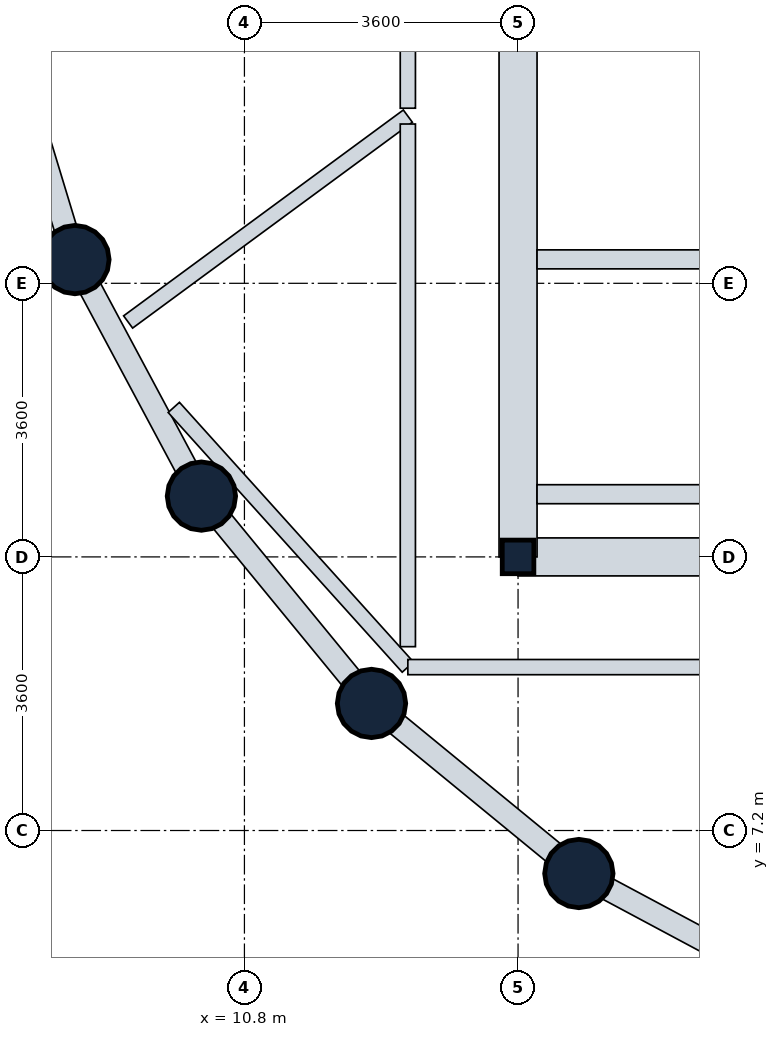
"""IFC4 building model, lengths in metres.
Left out: names, types, materials, properties, quantities, classifications, styles, units other than length and angle.
Written with IfcOpenShell. Run it as: python <this file> out.ifc"""

import sys

from ifc_helpers import new_model, si_unit, direction, frame, frame_2d, origin, origin_2d, place, context, subcontext, project, spatial, rectangle, circle, i_section, extrude, element, fill, save


model = new_model("IFC4")
c1 = context("Model", 3, precision=1e-05, world=origin(), true_north=direction((0.0, 1.0)))
c2 = subcontext(c1, "Body", "Model", "MODEL_VIEW")
j1 = project(units=[si_unit("LENGTHUNIT", "METRE"), si_unit("PLANEANGLEUNIT", "RADIAN")], contexts=[c1])
p1 = place(None, origin())
s1 = spatial("IfcSite", under=j1, at=p1, CompositionType="ELEMENT")
p2 = place(p1, origin())
s2 = spatial("IfcBuilding", under=s1, at=p2, CompositionType="ELEMENT")
p3 = place(p2, frame((0.0, 0.0, 139.0)))
s3 = spatial("IfcBuildingStorey", under=s2, at=p3, CompositionType="ELEMENT", Elevation=139.0)
for number, where, z_axis, x_axis in (
    (1, (8.57, 14.712, 0.0), (0.0, 0.0, 1.0), (1.0, 0.0, 0.0)),
    (2, (10.234, 11.6, 0.0), (0.0, 0.0, 1.0), (1.0, 0.0, 0.0)),
    (3, (12.472, 8.872, 0.0), (0.0, 0.0, 1.0), (1.0, 0.0, 0.0)),
):
    element("IfcColumn", number, at=place(p3, frame(where, z_axis=z_axis, x_axis=x_axis)), inside=s3, PredefinedType="COLUMN", context=c2, shape_type="SweptSolid", body=[
        extrude(circle(Radius=0.45, at=origin_2d()), origin(), (0.0, 0.0, 1.0), 3.8),
    ])
p4 = place(p3, frame((14.4, 10.8, 0.0), z_axis=(0.0, 0.0, 1.0), x_axis=(1.0, 0.0, 0.0)))
e4 = element("IfcColumn", 4, at=p4, inside=s3, PredefinedType="COLUMN", context=c2, shape_type="SweptSolid", body=[
    extrude(i_section(OverallWidth=0.416, OverallDepth=0.442, WebThickness=0.025, FlangeThickness=0.041, FilletRadius=0.015, at=origin_2d()), origin(), (0.0, 0.0, 1.0), 3.8),
])
p5 = place(p3, frame((15.2, 6.634, 0.0), z_axis=(0.0, 0.0, 1.0), x_axis=(1.0, 0.0, 0.0)))
e5 = element("IfcColumn", 5, at=p5, inside=s3, PredefinedType="COLUMN", context=c2, shape_type="SweptSolid", body=[
    extrude(circle(Radius=0.45, at=origin_2d()), origin(), (0.0, 0.0, 1.0), 3.8),
])
p6 = place(p3, frame((8.57, 14.712, 0.0), z_axis=(0.0, 0.0, 1.0), x_axis=(-0.290305086481, 0.956934144423, 0.0)))
e6 = element("IfcWall", 6, at=p6, inside=s3, PredefinedType="STANDARD", context=c2, shape_type="SweptSolid", body=[
    extrude(rectangle(XDim=3.528, YDim=0.3, at=frame_2d((1.764, 0.0))), origin(), (0.0, 0.0, 1.0), 2.93),
])
p7 = place(p6, frame((0.964, 0.0, 0.85)))
e7 = element("IfcOpeningElement", 7, at=p7, cuts=e6, PredefinedType="OPENING", context=c2, shape_type="SweptSolid", body=[
    extrude(rectangle(XDim=1.6, YDim=1.35, at=frame_2d((0.8, 0.675))), frame((0.0, 0.16, 0.0), z_axis=(0.0, -1.0, 0.0), x_axis=(1.0, 0.0, 0.0)), (0.0, 0.0, 1.0), 0.32),
])
p8 = place(p3, frame((10.234, 11.6, 0.0), z_axis=(0.0, 0.0, 1.0), x_axis=(-0.47151087309, 0.881860247748, 0.0)))
e8 = element("IfcWall", 8, at=p8, inside=s3, PredefinedType="STANDARD", context=c2, shape_type="SweptSolid", body=[
    extrude(rectangle(XDim=3.529, YDim=0.3, at=frame_2d((1.764, 0.0))), origin(), (0.0, 0.0, 1.0), 2.93),
])
p9 = place(p3, frame((12.472, 8.872, 0.0), z_axis=(0.0, 0.0, 1.0), x_axis=(-0.634258295121, 0.773121216285, 0.0)))
e9 = element("IfcWall", 9, at=p9, inside=s3, PredefinedType="STANDARD", context=c2, shape_type="SweptSolid", body=[
    extrude(rectangle(XDim=3.529, YDim=0.3, at=frame_2d((1.764, 0.0))), origin(), (0.0, 0.0, 1.0), 2.93),
])
p10 = place(p9, frame((0.964, 0.0, 0.85)))
e10 = element("IfcOpeningElement", 10, at=p10, cuts=e9, PredefinedType="OPENING", context=c2, shape_type="SweptSolid", body=[
    extrude(rectangle(XDim=1.6, YDim=1.35, at=frame_2d((0.8, 0.675))), frame((0.0, 0.16, 0.0), z_axis=(0.0, -1.0, 0.0), x_axis=(1.0, 0.0, 0.0)), (0.0, 0.0, 1.0), 0.32),
])
p11 = place(p3, frame((15.2, 6.634, 0.0), z_axis=(0.0, 0.0, 1.0), x_axis=(-0.773121216285, 0.634258295121, 0.0)))
e11 = element("IfcWall", 11, at=p11, inside=s3, PredefinedType="STANDARD", context=c2, shape_type="SweptSolid", body=[
    extrude(rectangle(XDim=3.529, YDim=0.3, at=frame_2d((1.764, 0.0))), origin(), (0.0, 0.0, 1.0), 2.93),
])
p12 = place(p11, frame((0.964, 0.0, 0.85)))
e12 = element("IfcOpeningElement", 12, at=p12, cuts=e11, PredefinedType="OPENING", context=c2, shape_type="SweptSolid", body=[
    extrude(rectangle(XDim=1.6, YDim=1.35, at=frame_2d((0.8, 0.675))), frame((0.0, 0.16, 0.0), z_axis=(0.0, -1.0, 0.0), x_axis=(1.0, 0.0, 0.0)), (0.0, 0.0, 1.0), 0.32),
])
p13 = place(p3, frame((18.312, 4.97, 0.0), z_axis=(0.0, 0.0, 1.0), x_axis=(-0.881846862014, 0.471535907389, 0.0)))
e13 = element("IfcWall", 13, at=p13, inside=s3, PredefinedType="STANDARD", context=c2, shape_type="SweptSolid", body=[
    extrude(rectangle(XDim=3.529, YDim=0.3, at=frame_2d((1.765, 0.0))), origin(), (0.0, 0.0, 1.0), 2.93),
])
p14 = place(p13, frame((0.964, 0.0, 0.85)))
e14 = element("IfcOpeningElement", 14, at=p14, cuts=e13, PredefinedType="OPENING", context=c2, shape_type="SweptSolid", body=[
    extrude(rectangle(XDim=1.6, YDim=1.35, at=frame_2d((0.8, 0.675))), frame((0.0, 0.16, 0.0), z_axis=(0.0, -1.0, 0.0), x_axis=(1.0, 0.0, 0.0)), (0.0, 0.0, 1.0), 0.32),
])
p15 = place(p3, frame((14.4, 10.8, 0.0), z_axis=(0.0, 0.0, 1.0), x_axis=(1.0, 0.0, 0.0)))
e15 = element("IfcWall", 15, at=p15, inside=s3, PredefinedType="SHEAR", context=c2, shape_type="SweptSolid", body=[
    extrude(rectangle(XDim=18.0, YDim=0.5, at=frame_2d((9.0, 0.0))), origin(), (0.0, 0.0, 1.0), 3.55),
])
p16 = place(p3, frame((14.4, 10.8, 0.0), z_axis=(0.0, 0.0, 1.0), x_axis=(0.0, 1.0, 0.0)))
e16 = element("IfcWall", 16, at=p16, inside=s3, PredefinedType="SHEAR", context=c2, shape_type="SweptSolid", body=[
    extrude(rectangle(XDim=14.4, YDim=0.5, at=frame_2d((7.2, 0.0))), origin(), (0.0, 0.0, 1.0), 3.55),
])
p17 = place(p16, frame((11.05, 0.0, 0.0)))
e17 = element("IfcOpeningElement", 17, at=p17, cuts=e16, PredefinedType="OPENING", context=c2, shape_type="SweptSolid", body=[
    extrude(rectangle(XDim=1.1, YDim=2.1, at=frame_2d((0.55, 1.05))), frame((0.0, 0.26, 0.0), z_axis=(0.0, -1.0, 0.0), x_axis=(1.0, 0.0, 0.0)), (0.0, 0.0, 1.0), 0.52),
])
p18 = place(p16, frame((4.9, 0.0, 0.0)))
e18 = element("IfcOpeningElement", 18, at=p18, cuts=e16, PredefinedType="OPENING", context=c2, shape_type="SweptSolid", body=[
    extrude(rectangle(XDim=1.2, YDim=2.1, at=frame_2d((0.6, 1.05))), frame((0.0, 0.26, 0.0), z_axis=(0.0, -1.0, 0.0), x_axis=(1.0, 0.0, 0.0)), (0.0, 0.0, 1.0), 0.52),
])
p19 = place(p16, frame((8.15, 0.0, 0.0)))
e19 = element("IfcOpeningElement", 19, at=p19, cuts=e16, PredefinedType="OPENING", context=c2, shape_type="SweptSolid", body=[
    extrude(rectangle(XDim=0.9, YDim=2.1, at=frame_2d((0.45, 1.05))), frame((0.0, 0.26, 0.0), z_axis=(0.0, -1.0, 0.0), x_axis=(1.0, 0.0, 0.0)), (0.0, 0.0, 1.0), 0.52),
])
p20 = place(p3, frame((14.65, 11.625, 0.0), z_axis=(0.0, 0.0, 1.0), x_axis=(1.0, 0.0, 0.0)))
e20 = element("IfcWall", 20, at=p20, inside=s3, PredefinedType="SHEAR", context=c2, shape_type="SweptSolid", body=[
    extrude(rectangle(XDim=8.7, YDim=0.25, at=frame_2d((4.35, 0.0))), origin(), (0.0, 0.0, 1.0), 3.55),
])
p21 = place(p3, frame((14.65, 14.715, 0.0), z_axis=(0.0, 0.0, 1.0), x_axis=(1.0, 0.0, 0.0)))
e21 = element("IfcWall", 21, at=p21, inside=s3, PredefinedType="SHEAR", context=c2, shape_type="SweptSolid", body=[
    extrude(rectangle(XDim=8.7, YDim=0.25, at=frame_2d((4.35, 0.0))), origin(), (0.0, 0.0, 1.0), 3.55),
])
p22 = place(p21, frame((0.705, 0.0, 0.0)))
e22 = element("IfcOpeningElement", 22, at=p22, cuts=e21, PredefinedType="OPENING", context=c2, shape_type="SweptSolid", body=[
    extrude(rectangle(XDim=1.1, YDim=2.1, at=frame_2d((0.55, 1.05))), frame((0.0, 0.135, 0.0), z_axis=(0.0, -1.0, 0.0), x_axis=(1.0, 0.0, 0.0)), (0.0, 0.0, 1.0), 0.27),
])
p23 = place(p3, frame((12.95, 9.35, 0.0), z_axis=(0.0, 0.0, 1.0), x_axis=(-0.669422074366, 0.742882282971, 0.0)))
e23 = element("IfcWall", 23, at=p23, inside=s3, PredefinedType="PARTITIONING", context=c2, shape_type="SweptSolid", body=[
    extrude(rectangle(XDim=4.6, YDim=0.2, at=frame_2d((2.3, 0.0))), origin(), (0.0, 0.0, 1.0), 2.93),
])
p24 = place(p3, frame((12.95, 16.6, 0.0), z_axis=(0.0, 0.0, 1.0), x_axis=(-0.805365932827, -0.592777963694, 0.0)))
e24 = element("IfcWall", 24, at=p24, inside=s3, PredefinedType="PARTITIONING", context=c2, shape_type="SweptSolid", body=[
    extrude(rectangle(XDim=4.57, YDim=0.2, at=frame_2d((2.285, 0.0))), origin(), (0.0, 0.0, 1.0), 2.93),
])
p25 = place(p3, frame((12.95, 16.704, 0.0), z_axis=(0.0, 0.0, 1.0), x_axis=(0.0, 1.0, 0.0)))
e25 = element("IfcWall", 25, at=p25, inside=s3, PredefinedType="PARTITIONING", context=c2, shape_type="SweptSolid", body=[
    extrude(rectangle(XDim=8.417, YDim=0.2, at=frame_2d((4.208, 0.0))), origin(), (0.0, 0.0, 1.0), 3.18),
])
p26 = place(p25, frame((3.696, 0.0, 0.0)))
e26 = element("IfcOpeningElement", 26, at=p26, cuts=e25, PredefinedType="OPENING", context=c2, shape_type="SweptSolid", body=[
    extrude(rectangle(XDim=1.0, YDim=2.1, at=frame_2d((0.5, 1.05))), frame((0.0, 0.11, 0.0), z_axis=(0.0, -1.0, 0.0), x_axis=(1.0, 0.0, 0.0)), (0.0, 0.0, 1.0), 0.22),
])
p27 = place(p3, frame((12.95, 9.619, 0.0), z_axis=(0.0, 0.0, 1.0), x_axis=(0.0, 1.0, 0.0)))
e27 = element("IfcWall", 27, at=p27, inside=s3, PredefinedType="PARTITIONING", context=c2, shape_type="SweptSolid", body=[
    extrude(rectangle(XDim=6.877, YDim=0.2, at=frame_2d((3.438, 0.0))), origin(), (0.0, 0.0, 1.0), 3.17),
])
p28 = place(p27, frame((3.962, 0.0, 0.0)))
e28 = element("IfcOpeningElement", 28, at=p28, cuts=e27, PredefinedType="OPENING", context=c2, shape_type="SweptSolid", body=[
    extrude(rectangle(XDim=1.0, YDim=2.1, at=frame_2d((0.5, 1.05))), frame((0.0, 0.11, 0.0), z_axis=(0.0, -1.0, 0.0), x_axis=(1.0, 0.0, 0.0)), (0.0, 0.0, 1.0), 0.22),
])
p29 = place(p3, frame((12.95, 9.35, 0.0), z_axis=(0.0, 0.0, 1.0), x_axis=(1.0, 0.0, 0.0)))
e29 = element("IfcWall", 29, at=p29, inside=s3, PredefinedType="PARTITIONING", context=c2, shape_type="SweptSolid", body=[
    extrude(rectangle(XDim=15.771, YDim=0.2, at=frame_2d((7.885, 0.0))), origin(), (0.0, 0.0, 1.0), 3.17),
])
p30 = place(p29, frame((4.836, 0.0, 0.0)))
e30 = element("IfcOpeningElement", 30, at=p30, cuts=e29, PredefinedType="OPENING", context=c2, shape_type="SweptSolid", body=[
    extrude(rectangle(XDim=1.0, YDim=2.1, at=frame_2d((0.5, 1.05))), frame((0.0, 0.11, 0.0), z_axis=(0.0, -1.0, 0.0), x_axis=(1.0, 0.0, 0.0)), (0.0, 0.0, 1.0), 0.22),
])
p31 = place(p7, origin())
e31 = element("IfcWindow", 31, at=p31, inside=s3, PartitioningType="SINGLE_PANEL", PredefinedType="WINDOW", context=c2, shape_type="SweptSolid", body=[
    extrude(rectangle(XDim=1.6, YDim=1.35, at=frame_2d((0.8, 0.675))), frame((0.0, 0.03, 0.0), z_axis=(0.0, -1.0, 0.0), x_axis=(1.0, 0.0, 0.0)), (0.0, 0.0, 1.0), 0.06),
])
fill(e7, e31)
p32 = place(p10, origin())
e32 = element("IfcWindow", 32, at=p32, inside=s3, PartitioningType="SINGLE_PANEL", PredefinedType="WINDOW", context=c2, shape_type="SweptSolid", body=[
    extrude(rectangle(XDim=1.6, YDim=1.35, at=frame_2d((0.8, 0.675))), frame((0.0, 0.03, 0.0), z_axis=(0.0, -1.0, 0.0), x_axis=(1.0, 0.0, 0.0)), (0.0, 0.0, 1.0), 0.06),
])
fill(e10, e32)
p33 = place(p12, origin())
e33 = element("IfcWindow", 33, at=p33, inside=s3, PartitioningType="SINGLE_PANEL", PredefinedType="WINDOW", context=c2, shape_type="SweptSolid", body=[
    extrude(rectangle(XDim=1.6, YDim=1.35, at=frame_2d((0.8, 0.675))), frame((0.0, 0.03, 0.0), z_axis=(0.0, -1.0, 0.0), x_axis=(1.0, 0.0, 0.0)), (0.0, 0.0, 1.0), 0.06),
])
fill(e12, e33)
p34 = place(p14, origin())
e34 = element("IfcWindow", 34, at=p34, inside=s3, PartitioningType="SINGLE_PANEL", PredefinedType="WINDOW", context=c2, shape_type="SweptSolid", body=[
    extrude(rectangle(XDim=1.6, YDim=1.35, at=frame_2d((0.8, 0.675))), frame((0.0, 0.03, 0.0), z_axis=(0.0, -1.0, 0.0), x_axis=(1.0, 0.0, 0.0)), (0.0, 0.0, 1.0), 0.06),
])
fill(e14, e34)
p35 = place(p22, origin())
e35 = element("IfcDoor", 35, at=p35, inside=s3, OperationType="SINGLE_SWING_LEFT", PredefinedType="DOOR", context=c2, shape_type="SweptSolid", body=[
    extrude(rectangle(XDim=1.1, YDim=2.1, at=frame_2d((0.55, 1.05))), frame((0.0, 0.025, 0.0), z_axis=(0.0, -1.0, 0.0), x_axis=(1.0, 0.0, 0.0)), (0.0, 0.0, 1.0), 0.05),
])
fill(e22, e35)
p36 = place(p18, origin())
e36 = element("IfcDoor", 36, at=p36, inside=s3, OperationType="SINGLE_SWING_RIGHT", PredefinedType="DOOR", context=c2, shape_type="SweptSolid", body=[
    extrude(rectangle(XDim=1.2, YDim=2.1, at=frame_2d((0.6, 1.05))), frame((0.0, 0.025, 0.0), z_axis=(0.0, -1.0, 0.0), x_axis=(1.0, 0.0, 0.0)), (0.0, 0.0, 1.0), 0.05),
])
fill(e18, e36)
p37 = place(p28, origin())
e37 = element("IfcDoor", 37, at=p37, inside=s3, OperationType="SINGLE_SWING_RIGHT", PredefinedType="DOOR", context=c2, shape_type="SweptSolid", body=[
    extrude(rectangle(XDim=1.0, YDim=2.1, at=frame_2d((0.5, 1.05))), frame((0.0, 0.025, 0.0), z_axis=(0.0, -1.0, 0.0), x_axis=(1.0, 0.0, 0.0)), (0.0, 0.0, 1.0), 0.05),
])
fill(e28, e37)
save(model, sys.argv[1])
